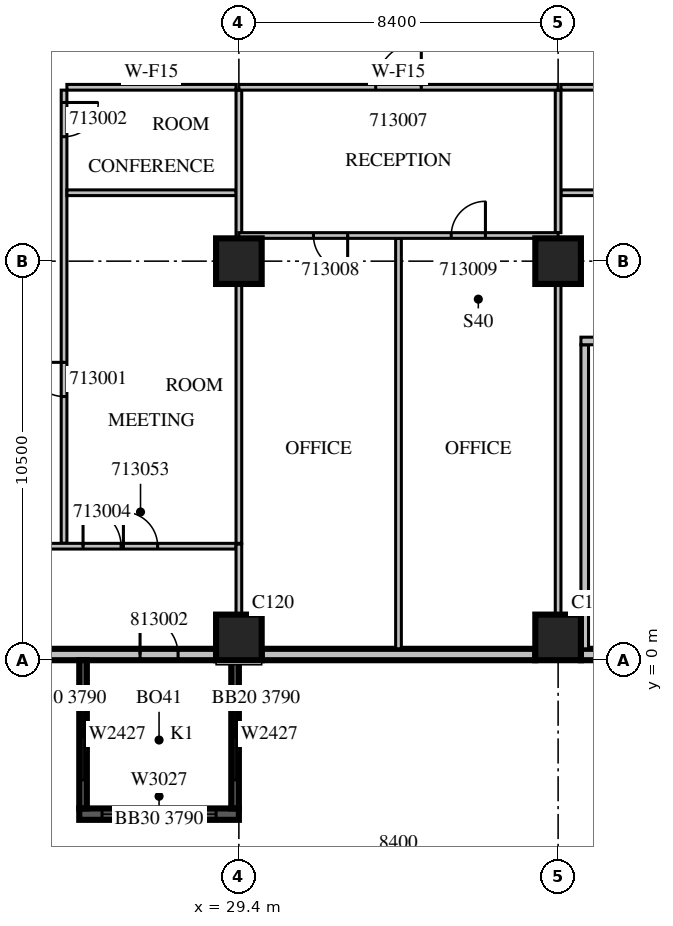
"""IFC4 building model, lengths in metres.
Left out: names, types, materials, properties, quantities, classifications, styles, units other than length and angle.
Written with IfcOpenShell. Run it as: python <this file> out.ifc"""

import sys

from ifc_helpers import new_model, si_unit, direction, frame, frame_2d, origin, origin_2d, place, context, subcontext, project, spatial, rectangle, extrude, source, transform, mapped, element, fill, save


model = new_model("IFC4")
c1 = context("Model", 3, precision=1e-05, world=origin(), true_north=direction((0.0, 1.0)))
c2 = subcontext(c1, "Body", "Model", "MODEL_VIEW")
j1 = project(units=[si_unit("LENGTHUNIT", "METRE"), si_unit("PLANEANGLEUNIT", "RADIAN")], contexts=[c1])
p1 = place(None, origin())
s1 = spatial("IfcSite", under=j1, at=p1, CompositionType="ELEMENT")
p2 = place(p1, origin())
s2 = spatial("IfcBuilding", under=s1, at=p2, CompositionType="ELEMENT")
p3 = place(p2, frame((0.0, 0.0, 65.7)))
s3 = spatial("IfcBuildingStorey", under=s2, at=p3, CompositionType="ELEMENT", Elevation=65.7)
m1 = source(origin(), c2, "Body", "SweptSolid", [
    extrude(rectangle(XDim=1.2, YDim=1.2, at=origin_2d()), origin(), (0.0, 0.0, 1.0), 4.2),
])
for number, where, z_axis, x_axis in (
    (1, (29.4, 0.6, 0.0), (0.0, 0.0, 1.0), (1.0, 0.0, 0.0)),
    (2, (37.8, 0.6, 0.0), (0.0, 0.0, 1.0), (1.0, 0.0, 0.0)),
    (3, (29.4, 10.5, 0.0), (0.0, 0.0, 1.0), (1.0, 0.0, 0.0)),
    (4, (37.8, 10.5, 0.0), (0.0, 0.0, 1.0), (1.0, 0.0, 0.0)),
):
    element("IfcColumn", number, at=place(p3, frame(where, z_axis=z_axis, x_axis=x_axis)), inside=s3, PredefinedType="COLUMN", context=c2, shape_type="MappedRepresentation", body=[
        mapped(m1, transform((0.0, 0.0, 0.0), scale=1.0)),
    ])
m2 = source(origin(), c2, "Body", "SweptSolid", [
    extrude(rectangle(XDim=7.2, YDim=0.3, at=frame_2d((3.6, 0.0))), origin(), (0.0, 0.0, 1.0), 3.8),
])
p4 = place(p3, frame((21.6, 0.15, 0.0), z_axis=(0.0, 0.0, 1.0), x_axis=(1.0, 0.0, 0.0)))
e5 = element("IfcWall", 5, at=p4, inside=s3, PredefinedType="STANDARD", context=c2, shape_type="MappedRepresentation", body=[
    mapped(m2, transform((0.0, 0.0, 0.0), scale=1.0)),
])
m3 = source(origin(), c2, "Body", "SweptSolid", [
    extrude(rectangle(XDim=2.4, YDim=2.7, at=frame_2d((1.2, 1.35))), frame((0.0, 0.16, 0.0), z_axis=(0.0, -1.0, 0.0), x_axis=(1.0, 0.0, 0.0)), (0.0, 0.0, 1.0), 0.32),
])
p5 = place(p4, frame((0.3, 0.0, 0.6)))
e6 = element("IfcOpeningElement", 6, at=p5, cuts=e5, PredefinedType="OPENING", context=c2, shape_type="MappedRepresentation", body=[
    mapped(m3, transform((0.0, 0.0, 0.0), scale=1.0)),
])
m4 = source(origin(), c2, "Body", "SweptSolid", [
    extrude(rectangle(XDim=1.0, YDim=2.1, at=frame_2d((0.5, 1.05))), frame((0.0, 0.16, 0.0), z_axis=(0.0, -1.0, 0.0), x_axis=(1.0, 0.0, 0.0)), (0.0, 0.0, 1.0), 0.32),
])
p6 = place(p4, frame((5.2, 0.0, 0.0)))
e7 = element("IfcOpeningElement", 7, at=p6, cuts=e5, PredefinedType="OPENING", context=c2, shape_type="MappedRepresentation", body=[
    mapped(m4, transform((0.0, 0.0, 0.0), scale=1.0)),
])
p7 = place(p3, frame((30.0, 0.15, 0.0), z_axis=(0.0, 0.0, 1.0), x_axis=(1.0, 0.0, 0.0)))
e8 = element("IfcWall", 8, at=p7, inside=s3, PredefinedType="STANDARD", context=c2, shape_type="MappedRepresentation", body=[
    mapped(m2, transform((0.0, 0.0, 0.0), scale=1.0)),
])
m5 = source(origin(), c2, "Body", "SweptSolid", [
    extrude(rectangle(XDim=1.8, YDim=0.3, at=frame_2d((0.9, 0.0))), origin(), (0.0, 0.0, 1.0), 3.8),
])
p8 = place(p3, frame((38.4, 0.15, 0.0), z_axis=(0.0, 0.0, 1.0), x_axis=(1.0, 0.0, 0.0)))
e9 = element("IfcWall", 9, at=p8, inside=s3, PredefinedType="STANDARD", context=c2, shape_type="MappedRepresentation", body=[
    mapped(m5, transform((0.0, 0.0, 0.0), scale=1.0)),
])
m6 = source(origin(), c2, "Body", "SweptSolid", [
    extrude(rectangle(XDim=4.2, YDim=0.3, at=frame_2d((2.1, 0.0))), origin(), (0.0, 0.0, 1.0), 3.79),
])
p9 = place(p3, frame((25.2, -4.05, 0.0), z_axis=(0.0, 0.0, 1.0), x_axis=(1.0, 0.0, 0.0)))
e10 = element("IfcWall", 10, at=p9, inside=s3, PredefinedType="SOLIDWALL", context=c2, shape_type="MappedRepresentation", body=[
    mapped(m6, transform((0.0, 0.0, 0.0), scale=1.0)),
])
m7 = source(origin(), c2, "Body", "SweptSolid", [
    extrude(rectangle(XDim=3.0, YDim=2.7, at=frame_2d((1.5, 1.35))), frame((0.0, 0.16, 0.0), z_axis=(0.0, -1.0, 0.0), x_axis=(1.0, 0.0, 0.0)), (0.0, 0.0, 1.0), 0.32),
])
p10 = place(p9, frame((0.6, 0.0, 0.6)))
e11 = element("IfcOpeningElement", 11, at=p10, cuts=e10, PredefinedType="OPENING", context=c2, shape_type="MappedRepresentation", body=[
    mapped(m7, transform((0.0, 0.0, 0.0), scale=1.0)),
])
m8 = source(origin(), c2, "Body", "SweptSolid", [
    extrude(rectangle(XDim=3.9, YDim=0.2, at=frame_2d((1.95, 0.0))), origin(), (0.0, 0.0, 1.0), 3.79),
])
p11 = place(p3, frame((25.3, 0.0, 0.0), z_axis=(0.0, 0.0, 1.0), x_axis=(0.0, -1.0, 0.0)))
e12 = element("IfcWall", 12, at=p11, inside=s3, PredefinedType="SOLIDWALL", context=c2, shape_type="MappedRepresentation", body=[
    mapped(m8, transform((0.0, 0.0, 0.0), scale=1.0)),
])
m9 = source(origin(), c2, "Body", "SweptSolid", [
    extrude(rectangle(XDim=2.4, YDim=2.7, at=frame_2d((1.2, 1.35))), frame((0.0, 0.11, 0.0), z_axis=(0.0, -1.0, 0.0), x_axis=(1.0, 0.0, 0.0)), (0.0, 0.0, 1.0), 0.22),
])
p12 = place(p11, frame((0.75, 0.0, 0.6)))
e13 = element("IfcOpeningElement", 13, at=p12, cuts=e12, PredefinedType="OPENING", context=c2, shape_type="MappedRepresentation", body=[
    mapped(m9, transform((0.0, 0.0, 0.0), scale=1.0)),
])
p13 = place(p3, frame((29.3, 0.0, 0.0), z_axis=(0.0, 0.0, 1.0), x_axis=(0.0, -1.0, 0.0)))
e14 = element("IfcWall", 14, at=p13, inside=s3, PredefinedType="SOLIDWALL", context=c2, shape_type="MappedRepresentation", body=[
    mapped(m8, transform((0.0, 0.0, 0.0), scale=1.0)),
])
p14 = place(p13, frame((0.75, 0.0, 0.6)))
e15 = element("IfcOpeningElement", 15, at=p14, cuts=e14, PredefinedType="OPENING", context=c2, shape_type="MappedRepresentation", body=[
    mapped(m9, transform((0.0, 0.0, 0.0), scale=1.0)),
])
m10 = source(origin(), c2, "Body", "SweptSolid", [
    extrude(rectangle(XDim=8.0, YDim=0.2, at=frame_2d((4.0, 0.0))), origin(), (0.0, 0.0, 1.0), 3.8),
])
p15 = place(p3, frame((38.5, 0.3, 0.0), z_axis=(0.0, 0.0, 1.0), x_axis=(0.0, 1.0, 0.0)))
e16 = element("IfcWall", 16, at=p15, inside=s3, PredefinedType="PARTITIONING", context=c2, shape_type="MappedRepresentation", body=[
    mapped(m10, transform((0.0, 0.0, 0.0), scale=1.0)),
])
m11 = source(origin(), c2, "Body", "SweptSolid", [
    extrude(rectangle(XDim=5.45, YDim=0.2, at=frame_2d((2.725, 0.0))), origin(), (0.0, 0.0, 1.0), 3.8),
])
p16 = place(p3, frame((38.4, 8.4, 0.0), z_axis=(0.0, 0.0, 1.0), x_axis=(1.0, 0.0, 0.0)))
e17 = element("IfcWall", 17, at=p16, inside=s3, PredefinedType="PARTITIONING", context=c2, shape_type="MappedRepresentation", body=[
    mapped(m11, transform((0.0, 0.0, 0.0), scale=1.0)),
])
m12 = source(origin(), c2, "Body", "SweptSolid", [
    extrude(rectangle(XDim=1.2, YDim=2.1, at=frame_2d((0.6, 1.05))), frame((0.0, 0.11, 0.0), z_axis=(0.0, -1.0, 0.0), x_axis=(1.0, 0.0, 0.0)), (0.0, 0.0, 1.0), 0.22),
])
p17 = place(p16, frame((0.4, 0.0, 0.0)))
e18 = element("IfcOpeningElement", 18, at=p17, cuts=e17, PredefinedType="OPENING", context=c2, shape_type="MappedRepresentation", body=[
    mapped(m12, transform((0.0, 0.0, 0.0), scale=1.0)),
])
m13 = source(origin(), c2, "Body", "SweptSolid", [
    extrude(rectangle(XDim=0.9, YDim=2.1, at=frame_2d((0.45, 1.05))), frame((0.0, 0.11, 0.0), z_axis=(0.0, -1.0, 0.0), x_axis=(1.0, 0.0, 0.0)), (0.0, 0.0, 1.0), 0.22),
])
p18 = place(p16, frame((3.25, 0.0, 0.0)))
e19 = element("IfcOpeningElement", 19, at=p18, cuts=e17, PredefinedType="OPENING", context=c2, shape_type="MappedRepresentation", body=[
    mapped(m13, transform((0.0, 0.0, 0.0), scale=1.0)),
])
m14 = source(origin(), c2, "Body", "SweptSolid", [
    extrude(rectangle(XDim=11.925, YDim=0.15, at=frame_2d((5.963, 0.0))), origin(), (0.0, 0.0, 1.0), 3.8),
])
p19 = place(p3, frame((24.8, 15.0, 0.0), z_axis=(0.0, 0.0, 1.0), x_axis=(0.0, -1.0, 0.0)))
e20 = element("IfcWall", 20, at=p19, inside=s3, PredefinedType="PARTITIONING", context=c2, shape_type="MappedRepresentation", body=[
    mapped(m14, transform((0.0, 0.0, 0.0), scale=1.0)),
])
m15 = source(origin(), c2, "Body", "SweptSolid", [
    extrude(rectangle(XDim=0.9, YDim=2.1, at=frame_2d((0.45, 1.05))), frame((0.0, 0.085, 0.0), z_axis=(0.0, -1.0, 0.0), x_axis=(1.0, 0.0, 0.0)), (0.0, 0.0, 1.0), 0.17),
])
p20 = place(p19, frame((7.162, 0.0, 0.0)))
e21 = element("IfcOpeningElement", 21, at=p20, cuts=e20, PredefinedType="OPENING", context=c2, shape_type="MappedRepresentation", body=[
    mapped(m15, transform((0.0, 0.0, 0.0), scale=1.0)),
])
p21 = place(p19, frame((0.325, 0.0, 0.0)))
e22 = element("IfcOpeningElement", 22, at=p21, cuts=e20, PredefinedType="OPENING", context=c2, shape_type="MappedRepresentation", body=[
    mapped(m15, transform((0.0, 0.0, 0.0), scale=1.0)),
])
p22 = place(p3, frame((29.325, 12.3, 0.0), z_axis=(0.0, 0.0, 1.0), x_axis=(-1.0, 0.0, 0.0)))
e23 = element("IfcWall", 23, at=p22, inside=s3, PredefinedType="PARTITIONING", context=c2, shape_type="SweptSolid", body=[
    extrude(rectangle(XDim=4.45, YDim=0.15, at=frame_2d((2.225, 0.0))), origin(), (0.0, 0.0, 1.0), 3.8),
])
m16 = source(origin(), c2, "Body", "SweptSolid", [
    extrude(rectangle(XDim=4.45, YDim=0.15, at=frame_2d((2.225, 0.0))), origin(), (0.0, 0.0, 1.0), 3.8),
])
p23 = place(p3, frame((29.325, 15.075, 0.0), z_axis=(0.0, 0.0, 1.0), x_axis=(-1.0, 0.0, 0.0)))
e24 = element("IfcWall", 24, at=p23, inside=s3, PredefinedType="PARTITIONING", context=c2, shape_type="MappedRepresentation", body=[
    mapped(m16, transform((0.0, 0.0, 0.0), scale=1.0)),
])
m17 = source(origin(), c2, "Body", "SweptSolid", [
    extrude(rectangle(XDim=6.826, YDim=0.15, at=frame_2d((3.413, 0.0))), origin(), (0.0, 0.0, 1.0), 3.8),
])
p24 = place(p3, frame((29.4, 3.075, 0.0), z_axis=(0.0, 0.0, 1.0), x_axis=(0.0, 1.0, 0.0)))
e25 = element("IfcWall", 25, at=p24, inside=s3, PredefinedType="PARTITIONING", context=c2, shape_type="MappedRepresentation", body=[
    mapped(m17, transform((0.0, 0.0, 0.0), scale=1.0)),
])
m18 = source(origin(), c2, "Body", "SweptSolid", [
    extrude(rectangle(XDim=3.901, YDim=0.15, at=frame_2d((1.95, 0.0))), origin(), (0.0, 0.0, 1.0), 3.8),
])
p25 = place(p3, frame((29.4, 11.099, 0.0), z_axis=(0.0, 0.0, 1.0), x_axis=(0.0, 1.0, 0.0)))
e26 = element("IfcWall", 26, at=p25, inside=s3, PredefinedType="PARTITIONING", context=c2, shape_type="MappedRepresentation", body=[
    mapped(m18, transform((0.0, 0.0, 0.0), scale=1.0)),
])
m19 = source(origin(), c2, "Body", "SweptSolid", [
    extrude(rectangle(XDim=7.125, YDim=0.15, at=frame_2d((3.562, 0.0))), origin(), (0.0, 0.0, 1.0), 3.8),
])
p26 = place(p3, frame((22.2, 3.0, 0.0), z_axis=(0.0, 0.0, 1.0), x_axis=(1.0, 0.0, 0.0)))
e27 = element("IfcWall", 27, at=p26, inside=s3, PredefinedType="PARTITIONING", context=c2, shape_type="MappedRepresentation", body=[
    mapped(m19, transform((0.0, 0.0, 0.0), scale=1.0)),
])
m20 = source(origin(), c2, "Body", "SweptSolid", [
    extrude(rectangle(XDim=1.0, YDim=2.1, at=frame_2d((0.5, 1.05))), frame((0.0, 0.085, 0.0), z_axis=(0.0, -1.0, 0.0), x_axis=(1.0, 0.0, 0.0)), (0.0, 0.0, 1.0), 0.17),
])
p27 = place(p26, frame((3.1, 0.0, 0.0)))
e28 = element("IfcOpeningElement", 28, at=p27, cuts=e27, PredefinedType="OPENING", context=c2, shape_type="MappedRepresentation", body=[
    mapped(m20, transform((0.0, 0.0, 0.0), scale=1.0)),
])
p28 = place(p26, frame((4.162, 0.0, 0.0)))
e29 = element("IfcOpeningElement", 29, at=p28, cuts=e27, PredefinedType="OPENING", context=c2, shape_type="MappedRepresentation", body=[
    mapped(m15, transform((0.0, 0.0, 0.0), scale=1.0)),
])
m21 = source(origin(), c2, "Body", "SweptSolid", [
    extrude(rectangle(XDim=6.45, YDim=0.15, at=frame_2d((3.225, 0.0))), origin(), (0.0, 0.0, 1.0), 3.8),
])
p29 = place(p3, frame((37.875, 12.3, 0.0), z_axis=(0.0, 0.0, 1.0), x_axis=(1.0, 0.0, 0.0)))
e30 = element("IfcWall", 30, at=p29, inside=s3, PredefinedType="PARTITIONING", context=c2, shape_type="MappedRepresentation", body=[
    mapped(m21, transform((0.0, 0.0, 0.0), scale=1.0)),
])
p30 = place(p3, frame((44.325, 15.075, 0.0), z_axis=(0.0, 0.0, 1.0), x_axis=(-1.0, 0.0, 0.0)))
e31 = element("IfcWall", 31, at=p30, inside=s3, PredefinedType="PARTITIONING", context=c2, shape_type="MappedRepresentation", body=[
    mapped(m21, transform((0.0, 0.0, 0.0), scale=1.0)),
])
p31 = place(p30, frame((2.812, 0.0, 0.0)))
e32 = element("IfcOpeningElement", 32, at=p31, cuts=e31, PredefinedType="OPENING", context=c2, shape_type="MappedRepresentation", body=[
    mapped(m15, transform((0.0, 0.0, 0.0), scale=1.0)),
])
m22 = source(origin(), c2, "Body", "SweptSolid", [
    extrude(rectangle(XDim=10.8, YDim=0.15, at=frame_2d((5.4, 0.0))), origin(), (0.0, 0.0, 1.0), 3.8),
])
p32 = place(p3, frame((33.6, 0.3, 0.0), z_axis=(0.0, 0.0, 1.0), x_axis=(0.0, 1.0, 0.0)))
e33 = element("IfcWall", 33, at=p32, inside=s3, PredefinedType="PARTITIONING", context=c2, shape_type="MappedRepresentation", body=[
    mapped(m22, transform((0.0, 0.0, 0.0), scale=1.0)),
])
m23 = source(origin(), c2, "Body", "SweptSolid", [
    extrude(rectangle(XDim=1.856, YDim=0.15, at=frame_2d((0.928, 0.0))), origin(), (0.0, 0.0, 1.0), 3.8),
])
p33 = place(p3, frame((29.4, 1.199, 0.0), z_axis=(0.0, 0.0, 1.0), x_axis=(0.0, 1.0, 0.0)))
e34 = element("IfcWall", 34, at=p33, inside=s3, PredefinedType="PARTITIONING", context=c2, shape_type="MappedRepresentation", body=[
    mapped(m23, transform((0.0, 0.0, 0.0), scale=1.0)),
])
m24 = source(origin(), c2, "Body", "SweptSolid", [
    extrude(rectangle(XDim=8.702, YDim=0.15, at=frame_2d((4.351, 0.0))), origin(), (0.0, 0.0, 1.0), 3.8),
])
p34 = place(p3, frame((37.8, 1.199, 0.0), z_axis=(0.0, 0.0, 1.0), x_axis=(0.0, 1.0, 0.0)))
e35 = element("IfcWall", 35, at=p34, inside=s3, PredefinedType="PARTITIONING", context=c2, shape_type="MappedRepresentation", body=[
    mapped(m24, transform((0.0, 0.0, 0.0), scale=1.0)),
])
m25 = source(origin(), c2, "Body", "SweptSolid", [
    extrude(rectangle(XDim=3.75, YDim=0.15, at=frame_2d((1.875, 0.0))), origin(), (0.0, 0.0, 1.0), 3.8),
])
p35 = place(p3, frame((37.8, 11.25, 0.0), z_axis=(0.0, 0.0, 1.0), x_axis=(0.0, 1.0, 0.0)))
e36 = element("IfcWall", 36, at=p35, inside=s3, PredefinedType="PARTITIONING", context=c2, shape_type="MappedRepresentation", body=[
    mapped(m25, transform((0.0, 0.0, 0.0), scale=1.0)),
])
m26 = source(origin(), c2, "Body", "SweptSolid", [
    extrude(rectangle(XDim=8.4, YDim=0.15, at=frame_2d((4.2, 0.0))), origin(), (0.0, 0.0, 1.0), 3.8),
])
p36 = place(p3, frame((37.8, 11.175, 0.0), z_axis=(0.0, 0.0, 1.0), x_axis=(-1.0, 0.0, 0.0)))
e37 = element("IfcWall", 37, at=p36, inside=s3, PredefinedType="PARTITIONING", context=c2, shape_type="MappedRepresentation", body=[
    mapped(m26, transform((0.0, 0.0, 0.0), scale=1.0)),
])
p37 = place(p36, frame((5.537, 0.0, 0.0)))
e38 = element("IfcOpeningElement", 38, at=p37, cuts=e37, PredefinedType="OPENING", context=c2, shape_type="MappedRepresentation", body=[
    mapped(m15, transform((0.0, 0.0, 0.0), scale=1.0)),
])
p38 = place(p36, frame((1.913, 0.0, 0.0)))
e39 = element("IfcOpeningElement", 39, at=p38, cuts=e37, PredefinedType="OPENING", context=c2, shape_type="MappedRepresentation", body=[
    mapped(m15, transform((0.0, 0.0, 0.0), scale=1.0)),
])
p39 = place(p3, frame((37.8, 15.075, 0.0), z_axis=(0.0, 0.0, 1.0), x_axis=(-1.0, 0.0, 0.0)))
e40 = element("IfcWall", 40, at=p39, inside=s3, PredefinedType="PARTITIONING", context=c2, shape_type="MappedRepresentation", body=[
    mapped(m26, transform((0.0, 0.0, 0.0), scale=1.0)),
])
m27 = source(origin(), c2, "Body", "SweptSolid", [
    extrude(rectangle(XDim=1.2, YDim=2.1, at=frame_2d((0.6, 1.05))), frame((0.0, 0.085, 0.0), z_axis=(0.0, -1.0, 0.0), x_axis=(1.0, 0.0, 0.0)), (0.0, 0.0, 1.0), 0.17),
])
p40 = place(p39, frame((3.6, 0.0, 0.0)))
e41 = element("IfcOpeningElement", 41, at=p40, cuts=e40, PredefinedType="OPENING", context=c2, shape_type="MappedRepresentation", body=[
    mapped(m27, transform((0.0, 0.0, 0.0), scale=1.0)),
])
m28 = source(origin(), c2, "Body", "SweptSolid", [
    extrude(rectangle(XDim=3.0, YDim=2.7, at=frame_2d((1.5, 1.35))), frame((0.0, 0.03, 0.0), z_axis=(0.0, -1.0, 0.0), x_axis=(1.0, 0.0, 0.0)), (0.0, 0.0, 1.0), 0.06),
])
p41 = place(p10, origin())
e42 = element("IfcWindow", 42, at=p41, inside=s3, PartitioningType="SINGLE_PANEL", PredefinedType="WINDOW", context=c2, shape_type="MappedRepresentation", body=[
    mapped(m28, transform((0.0, 0.0, 0.0), scale=1.0)),
])
fill(e11, e42)
m29 = source(origin(), c2, "Body", "SweptSolid", [
    extrude(rectangle(XDim=2.4, YDim=2.7, at=frame_2d((1.2, 1.35))), frame((0.0, 0.03, 0.0), z_axis=(0.0, -1.0, 0.0), x_axis=(1.0, 0.0, 0.0)), (0.0, 0.0, 1.0), 0.06),
])
p42 = place(p12, origin())
e43 = element("IfcWindow", 43, at=p42, inside=s3, PartitioningType="SINGLE_PANEL", PredefinedType="WINDOW", context=c2, shape_type="MappedRepresentation", body=[
    mapped(m29, transform((0.0, 0.0, 0.0), scale=1.0)),
])
fill(e13, e43)
p43 = place(p14, origin())
e44 = element("IfcWindow", 44, at=p43, inside=s3, PartitioningType="SINGLE_PANEL", PredefinedType="WINDOW", context=c2, shape_type="MappedRepresentation", body=[
    mapped(m29, transform((0.0, 0.0, 0.0), scale=1.0)),
])
fill(e15, e44)
m30 = source(origin(), c2, "Body", "SweptSolid", [
    extrude(rectangle(XDim=0.9, YDim=2.1, at=frame_2d((0.45, 1.05))), frame((0.0, 0.025, 0.0), z_axis=(0.0, -1.0, 0.0), x_axis=(1.0, 0.0, 0.0)), (0.0, 0.0, 1.0), 0.05),
])
p44 = place(p20, origin())
e45 = element("IfcDoor", 45, at=p44, inside=s3, OperationType="SINGLE_SWING_RIGHT", PredefinedType="DOOR", context=c2, shape_type="MappedRepresentation", body=[
    mapped(m30, transform((0.0, 0.0, 0.0), scale=1.0)),
])
fill(e21, e45)
p45 = place(p21, origin())
e46 = element("IfcDoor", 46, at=p45, inside=s3, OperationType="SINGLE_SWING_LEFT", PredefinedType="DOOR", context=c2, shape_type="MappedRepresentation", body=[
    mapped(m30, transform((0.0, 0.0, 0.0), scale=1.0)),
])
fill(e22, e46)
m31 = source(origin(), c2, "Body", "SweptSolid", [
    extrude(rectangle(XDim=1.0, YDim=2.1, at=frame_2d((0.5, 1.05))), frame((0.0, 0.025, 0.0), z_axis=(0.0, -1.0, 0.0), x_axis=(1.0, 0.0, 0.0)), (0.0, 0.0, 1.0), 0.05),
])
p46 = place(p27, origin())
e47 = element("IfcDoor", 47, at=p46, inside=s3, OperationType="SINGLE_SWING_LEFT", PredefinedType="DOOR", context=c2, shape_type="MappedRepresentation", body=[
    mapped(m31, transform((0.0, 0.0, 0.0), scale=1.0)),
])
fill(e28, e47)
m32 = source(origin(), c2, "Body", "SweptSolid", [
    extrude(rectangle(XDim=1.2, YDim=2.1, at=frame_2d((0.6, 1.05))), frame((0.0, 0.025, 0.0), z_axis=(0.0, -1.0, 0.0), x_axis=(1.0, 0.0, 0.0)), (0.0, 0.0, 1.0), 0.05),
])
p47 = place(p40, origin())
e48 = element("IfcDoor", 48, at=p47, inside=s3, OperationType="SINGLE_SWING_RIGHT", PredefinedType="DOOR", context=c2, shape_type="MappedRepresentation", body=[
    mapped(m32, transform((0.0, 0.0, 0.0), scale=1.0)),
])
fill(e41, e48)
p48 = place(p37, origin())
e49 = element("IfcDoor", 49, at=p48, inside=s3, OperationType="SINGLE_SWING_LEFT", PredefinedType="DOOR", context=c2, shape_type="MappedRepresentation", body=[
    mapped(m30, transform((0.0, 0.0, 0.0), scale=1.0)),
])
fill(e38, e49)
p49 = place(p38, origin())
e50 = element("IfcDoor", 50, at=p49, inside=s3, OperationType="SINGLE_SWING_RIGHT", PredefinedType="DOOR", context=c2, shape_type="MappedRepresentation", body=[
    mapped(m30, transform((0.0, 0.0, 0.0), scale=1.0)),
])
fill(e39, e50)
p50 = place(p28, origin())
e51 = element("IfcDoor", 51, at=p50, inside=s3, OperationType="SINGLE_SWING_LEFT", PredefinedType="DOOR", context=c2, shape_type="MappedRepresentation", body=[
    mapped(m30, transform((0.0, 0.0, 0.0), scale=1.0)),
])
fill(e29, e51)
p51 = place(p6, origin())
e52 = element("IfcDoor", 52, at=p51, inside=s3, OperationType="SINGLE_SWING_LEFT", PredefinedType="DOOR", context=c2, shape_type="MappedRepresentation", body=[
    mapped(m31, transform((0.0, 0.0, 0.0), scale=1.0)),
])
fill(e7, e52)
save(model, sys.argv[1])
